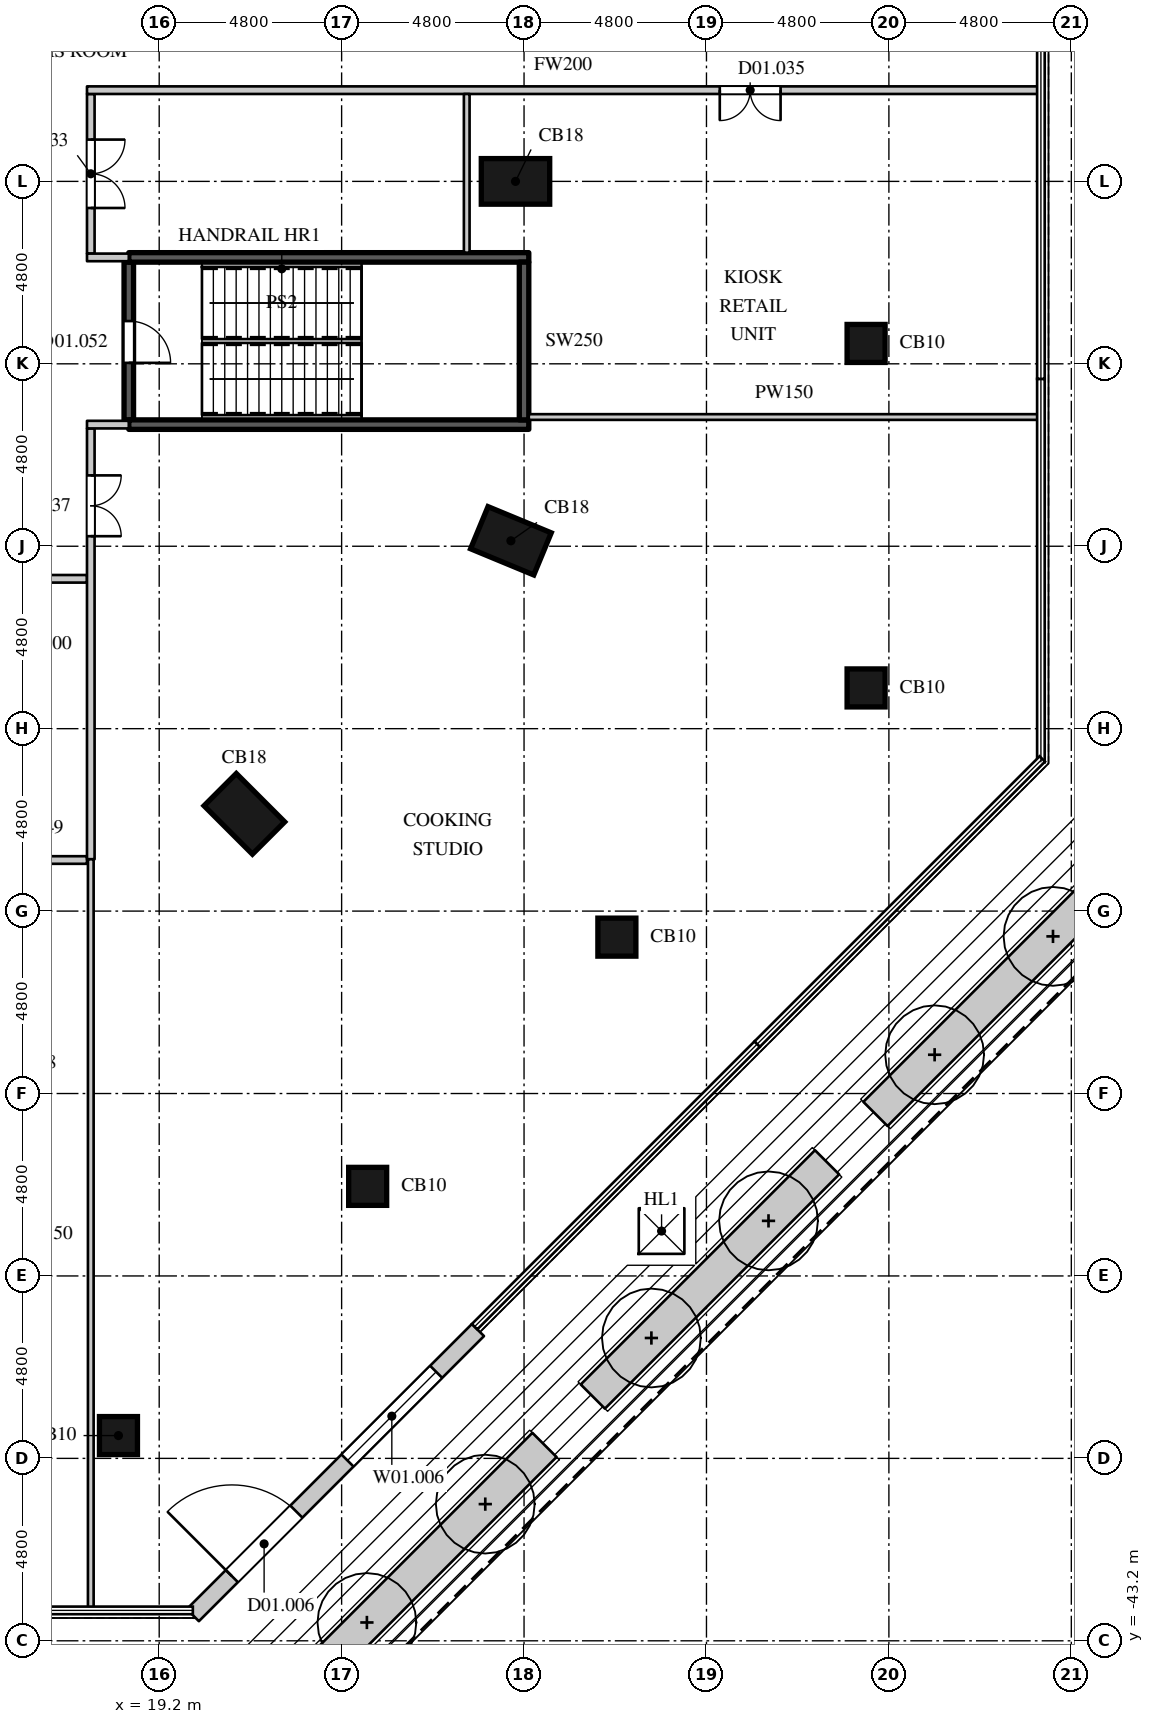
"""IFC4 building model, lengths in metres.
Left out: names, types, materials, properties, quantities, classifications, styles, units other than length and angle.
Written with IfcOpenShell. Run it as: python <this file> out.ifc"""

import sys

from ifc_helpers import new_model, si_unit, direction, frame, frame_2d, origin, origin_2d, place, context, subcontext, project, spatial, rectangle, extrude, element, fill, save


model = new_model("IFC4")
c1 = context("Model", 3, precision=1e-05, world=origin(), true_north=direction((0.0, 1.0)))
c2 = subcontext(c1, "Body", "Model", "MODEL_VIEW")
j1 = project(units=[si_unit("LENGTHUNIT", "METRE"), si_unit("PLANEANGLEUNIT", "RADIAN")], contexts=[c1])
p1 = place(None, origin())
s1 = spatial("IfcSite", under=j1, at=p1, CompositionType="ELEMENT")
p2 = place(p1, origin())
s2 = spatial("IfcBuilding", under=s1, at=p2, CompositionType="ELEMENT")
p3 = place(p2, frame((0.0, 0.0, 6.0)))
s3 = spatial("IfcBuildingStorey", under=s2, at=p3, CompositionType="ELEMENT", Elevation=6.0)
for number, where, z_axis, x_axis in (
    (1, (18.128, -37.8, 0.0), (0.0, 0.0, 1.0), (1.0, 0.0, 0.0)),
    (2, (24.685, -31.243, 0.0), (0.0, 0.0, 1.0), (1.0, 0.0, 0.0)),
    (3, (31.243, -24.685, 0.0), (0.0, 0.0, 1.0), (1.0, 0.0, 0.0)),
):
    element("IfcColumn", number, at=place(p3, frame(where, z_axis=z_axis, x_axis=x_axis)), inside=s3, PredefinedType="COLUMN", context=c2, shape_type="SweptSolid", body=[
        extrude(rectangle(XDim=1.0, YDim=1.0, at=origin_2d()), origin(), (0.0, 0.0, 1.0), 5.0),
    ])
p4 = place(p3, frame((21.441, -21.441, 0.0), z_axis=(0.0, 0.0, 1.0), x_axis=(0.707106781187, 0.707106781187, 0.0)))
e4 = element("IfcColumn", 4, at=p4, inside=s3, PredefinedType="COLUMN", context=c2, shape_type="SweptSolid", body=[
    extrude(rectangle(XDim=1.2, YDim=1.8, at=origin_2d()), origin(), (0.0, 0.0, 1.0), 5.0),
])
p5 = place(p3, frame((37.8, -18.128, 0.0), z_axis=(0.0, 0.0, 1.0), x_axis=(1.0, 0.0, 0.0)))
e5 = element("IfcColumn", 5, at=p5, inside=s3, PredefinedType="COLUMN", context=c2, shape_type="SweptSolid", body=[
    extrude(rectangle(XDim=1.0, YDim=1.0, at=origin_2d()), origin(), (0.0, 0.0, 1.0), 5.0),
])
p6 = place(p3, frame((28.454, -14.257, 0.0), z_axis=(0.0, 0.0, 1.0), x_axis=(0.382683496864, 0.923879505795, 0.0)))
e6 = element("IfcColumn", 6, at=p6, inside=s3, PredefinedType="COLUMN", context=c2, shape_type="SweptSolid", body=[
    extrude(rectangle(XDim=1.2, YDim=1.8, at=origin_2d()), origin(), (0.0, 0.0, 1.0), 5.0),
])
p7 = place(p3, frame((37.8, -9.064, 0.0), z_axis=(0.0, 0.0, 1.0), x_axis=(1.0, 0.0, 0.0)))
e7 = element("IfcColumn", 7, at=p7, inside=s3, PredefinedType="COLUMN", context=c2, shape_type="SweptSolid", body=[
    extrude(rectangle(XDim=1.0, YDim=1.0, at=origin_2d()), origin(), (0.0, 0.0, 1.0), 5.0),
])
p8 = place(p3, frame((28.575, -4.8, 0.0), z_axis=(0.0, 0.0, 1.0), x_axis=(0.0, 1.0, 0.0)))
e8 = element("IfcColumn", 8, at=p8, inside=s3, PredefinedType="COLUMN", context=c2, shape_type="SweptSolid", body=[
    extrude(rectangle(XDim=1.2, YDim=1.8, at=origin_2d()), origin(), (0.0, 0.0, 1.0), 5.0),
])
p9 = place(p3, frame((20.085, -42.525, 0.0), z_axis=(0.0, 0.0, 1.0), x_axis=(0.707106781187, 0.707106781187, 0.0)))
e9 = element("IfcWall", 9, at=p9, inside=s3, PredefinedType="ELEMENTEDWALL", context=c2, shape_type="SweptSolid", body=[
    extrude(rectangle(XDim=10.609, YDim=0.45, at=frame_2d((5.305, 0.0))), origin(), (0.0, 0.0, 1.0), 4.7),
])
p10 = place(p9, frame((1.452, 0.0, 0.0)))
e10 = element("IfcOpeningElement", 10, at=p10, cuts=e9, PredefinedType="OPENING", context=c2, shape_type="SweptSolid", body=[
    extrude(rectangle(XDim=2.4, YDim=2.7, at=frame_2d((1.2, 1.35))), frame((0.0, 0.235, 0.0), z_axis=(0.0, -1.0, 0.0), x_axis=(1.0, 0.0, 0.0)), (0.0, 0.0, 1.0), 0.47),
])
p11 = place(p9, frame((5.755, 0.0, 1.05)))
e11 = element("IfcOpeningElement", 11, at=p11, cuts=e9, PredefinedType="OPENING", context=c2, shape_type="SweptSolid", body=[
    extrude(rectangle(XDim=3.3, YDim=2.7, at=frame_2d((1.65, 1.35))), frame((0.0, 0.235, 0.0), z_axis=(0.0, -1.0, 0.0), x_axis=(1.0, 0.0, 0.0)), (0.0, 0.0, 1.0), 0.47),
])
p12 = place(p3, frame((23.108, -44.275, 0.0), z_axis=(0.0, 0.0, 1.0), x_axis=(0.707106781187, 0.707106781187, 0.0)))
e12 = element("IfcWall", 12, at=p12, inside=s3, PredefinedType="USERDEFINED", context=c2, shape_type="SweptSolid", body=[
    extrude(rectangle(XDim=8.81, YDim=0.9, at=frame_2d((4.405, 0.0))), origin(), (0.0, 0.0, 1.0), 0.9),
])
p13 = place(p3, frame((30.61, -36.773, 0.0), z_axis=(0.0, 0.0, 1.0), x_axis=(0.707106781187, 0.707106781187, 0.0)))
e13 = element("IfcWall", 13, at=p13, inside=s3, PredefinedType="USERDEFINED", context=c2, shape_type="SweptSolid", body=[
    extrude(rectangle(XDim=8.716, YDim=0.9, at=frame_2d((4.358, 0.0))), origin(), (0.0, 0.0, 1.0), 0.9),
])
p14 = place(p3, frame((38.046, -29.337, 0.0), z_axis=(0.0, 0.0, 1.0), x_axis=(0.707106781187, 0.707106781187, 0.0)))
e14 = element("IfcWall", 14, at=p14, inside=s3, PredefinedType="USERDEFINED", context=c2, shape_type="SweptSolid", body=[
    extrude(rectangle(XDim=8.81, YDim=0.9, at=frame_2d((4.405, 0.0))), origin(), (0.0, 0.0, 1.0), 0.9),
])
p15 = place(p3, frame((11.325, -22.656, 0.0), z_axis=(0.0, 0.0, 1.0), x_axis=(1.0, 0.0, 0.0)))
e15 = element("IfcWall", 15, at=p15, inside=s3, PredefinedType="PARTITIONING", context=c2, shape_type="SweptSolid", body=[
    extrude(rectangle(XDim=5.975, YDim=0.2, at=frame_2d((2.988, 0.0))), origin(), (0.0, 0.0, 1.0), 4.4),
])
p16 = place(p15, frame((2.55, 0.0, 0.0)))
e16 = element("IfcOpeningElement", 16, at=p16, cuts=e15, PredefinedType="OPENING", context=c2, shape_type="SweptSolid", body=[
    extrude(rectangle(XDim=0.9, YDim=2.2, at=frame_2d((0.45, 1.1))), frame((0.0, 0.11, 0.0), z_axis=(0.0, -1.0, 0.0), x_axis=(1.0, 0.0, 0.0)), (0.0, 0.0, 1.0), 0.22),
])
p17 = place(p3, frame((11.1, -15.257, 0.0), z_axis=(0.0, 0.0, 1.0), x_axis=(1.0, 0.0, 0.0)))
e17 = element("IfcWall", 17, at=p17, inside=s3, PredefinedType="PARTITIONING", context=c2, shape_type="SweptSolid", body=[
    extrude(rectangle(XDim=6.2, YDim=0.2, at=frame_2d((3.1, 0.0))), origin(), (0.0, 0.0, 1.0), 4.4),
])
p18 = place(p3, frame((17.4, -22.636, 0.0), z_axis=(0.0, 0.0, 1.0), x_axis=(0.0, 1.0, 0.0)))
e18 = element("IfcWall", 18, at=p18, inside=s3, PredefinedType="PARTITIONING", context=c2, shape_type="SweptSolid", body=[
    extrude(rectangle(XDim=11.336, YDim=0.2, at=frame_2d((5.668, 0.0))), origin(), (0.0, 0.0, 1.0), 4.4),
])
p19 = place(p18, frame((8.5, 0.0, 0.0)))
e19 = element("IfcOpeningElement", 19, at=p19, cuts=e18, PredefinedType="OPENING", context=c2, shape_type="SweptSolid", body=[
    extrude(rectangle(XDim=1.6, YDim=2.4, at=frame_2d((0.8, 1.2))), frame((0.0, 0.11, 0.0), z_axis=(0.0, -1.0, 0.0), x_axis=(1.0, 0.0, 0.0)), (0.0, 0.0, 1.0), 0.22),
])
p20 = place(p3, frame((17.3, -11.2, 0.0), z_axis=(0.0, 0.0, 1.0), x_axis=(1.0, 0.0, 0.0)))
e20 = element("IfcWall", 20, at=p20, inside=s3, PredefinedType="PARTITIONING", context=c2, shape_type="SweptSolid", body=[
    extrude(rectangle(XDim=1.1, YDim=0.2, at=frame_2d((0.55, 0.0))), origin(), (0.0, 0.0, 1.0), 4.4),
])
p21 = place(p3, frame((17.4, -6.7, 0.0), z_axis=(0.0, 0.0, 1.0), x_axis=(0.0, 1.0, 0.0)))
e21 = element("IfcWall", 21, at=p21, inside=s3, PredefinedType="PARTITIONING", context=c2, shape_type="SweptSolid", body=[
    extrude(rectangle(XDim=4.2, YDim=0.2, at=frame_2d((2.1, 0.0))), origin(), (0.0, 0.0, 1.0), 4.4),
])
p22 = place(p21, frame((1.2, 0.0, 0.0)))
e22 = element("IfcOpeningElement", 22, at=p22, cuts=e21, PredefinedType="OPENING", context=c2, shape_type="SweptSolid", body=[
    extrude(rectangle(XDim=1.8, YDim=2.4, at=frame_2d((0.9, 1.2))), frame((0.0, 0.11, 0.0), z_axis=(0.0, -1.0, 0.0), x_axis=(1.0, 0.0, 0.0)), (0.0, 0.0, 1.0), 0.22),
])
p23 = place(p3, frame((17.3, -6.8, 0.0), z_axis=(0.0, 0.0, 1.0), x_axis=(1.0, 0.0, 0.0)))
e23 = element("IfcWall", 23, at=p23, inside=s3, PredefinedType="PARTITIONING", context=c2, shape_type="SweptSolid", body=[
    extrude(rectangle(XDim=1.1, YDim=0.2, at=frame_2d((0.55, 0.0))), origin(), (0.0, 0.0, 1.0), 4.4),
])
p24 = place(p3, frame((17.3, -2.4, 0.0), z_axis=(0.0, 0.0, 1.0), x_axis=(1.0, 0.0, 0.0)))
e24 = element("IfcWall", 24, at=p24, inside=s3, PredefinedType="PARTITIONING", context=c2, shape_type="SweptSolid", body=[
    extrude(rectangle(XDim=25.055, YDim=0.2, at=frame_2d((12.527, 0.0))), origin(), (0.0, 0.0, 1.0), 4.4),
])
p25 = place(p24, frame((16.65, 0.0, 0.0)))
e25 = element("IfcOpeningElement", 25, at=p25, cuts=e24, PredefinedType="OPENING", context=c2, shape_type="SweptSolid", body=[
    extrude(rectangle(XDim=1.6, YDim=2.4, at=frame_2d((0.8, 1.2))), frame((0.0, 0.11, 0.0), z_axis=(0.0, -1.0, 0.0), x_axis=(1.0, 0.0, 0.0)), (0.0, 0.0, 1.0), 0.22),
])
p26 = place(p3, frame((17.4, -42.355, 0.0), z_axis=(0.0, 0.0, 1.0), x_axis=(0.0, 1.0, 0.0)))
e26 = element("IfcWall", 26, at=p26, inside=s3, PredefinedType="PARTITIONING", context=c2, shape_type="SweptSolid", body=[
    extrude(rectangle(XDim=19.719, YDim=0.15, at=frame_2d((9.86, 0.0))), origin(), (0.0, 0.0, 1.0), 4.4),
])
p27 = place(p3, frame((27.292, -6.675, 0.0), z_axis=(0.0, 0.0, 1.0), x_axis=(0.0, 1.0, 0.0)))
e27 = element("IfcWall", 27, at=p27, inside=s3, PredefinedType="PARTITIONING", context=c2, shape_type="SweptSolid", body=[
    extrude(rectangle(XDim=4.175, YDim=0.15, at=frame_2d((2.087, 0.0))), origin(), (0.0, 0.0, 1.0), 4.4),
])
p28 = place(p3, frame((28.925, -11.0, 0.0), z_axis=(0.0, 0.0, 1.0), x_axis=(1.0, 0.0, 0.0)))
e28 = element("IfcWall", 28, at=p28, inside=s3, PredefinedType="PARTITIONING", context=c2, shape_type="SweptSolid", body=[
    extrude(rectangle(XDim=13.43, YDim=0.15, at=frame_2d((6.715, 0.0))), origin(), (0.0, 0.0, 1.0), 4.4),
])
p29 = place(p3, frame((18.4, -11.075, 0.0), z_axis=(0.0, 0.0, 1.0), x_axis=(0.0, 1.0, 0.0)))
e29 = element("IfcWall", 29, at=p29, inside=s3, PredefinedType="SHEAR", context=c2, shape_type="SweptSolid", body=[
    extrude(rectangle(XDim=4.15, YDim=0.25, at=frame_2d((2.075, 0.0))), origin(), (0.0, 0.0, 1.0), 4.65),
])
p30 = place(p29, frame((1.5, 0.0, 0.0)))
e30 = element("IfcOpeningElement", 30, at=p30, cuts=e29, PredefinedType="OPENING", context=c2, shape_type="SweptSolid", body=[
    extrude(rectangle(XDim=1.1, YDim=2.2, at=frame_2d((0.55, 1.1))), frame((0.0, 0.135, 0.0), z_axis=(0.0, -1.0, 0.0), x_axis=(1.0, 0.0, 0.0)), (0.0, 0.0, 1.0), 0.27),
])
for number, where, z_axis, x_axis in (
    (31, (18.4, -11.2, 0.0), (0.0, 0.0, 1.0), (1.0, 0.0, 0.0)),
    (32, (18.4, -6.8, 0.0), (0.0, 0.0, 1.0), (1.0, 0.0, 0.0)),
):
    element("IfcWall", number, at=place(p3, frame(where, z_axis=z_axis, x_axis=x_axis)), inside=s3, PredefinedType="SHEAR", context=c2, shape_type="SweptSolid", body=[
        extrude(rectangle(XDim=10.525, YDim=0.25, at=frame_2d((5.263, 0.0))), origin(), (0.0, 0.0, 1.0), 4.65),
    ])
p31 = place(p3, frame((28.8, -11.075, 0.0), z_axis=(0.0, 0.0, 1.0), x_axis=(0.0, 1.0, 0.0)))
e33 = element("IfcWall", 33, at=p31, inside=s3, PredefinedType="SHEAR", context=c2, shape_type="SweptSolid", body=[
    extrude(rectangle(XDim=4.15, YDim=0.25, at=frame_2d((2.075, 0.0))), origin(), (0.0, 0.0, 1.0), 4.65),
])
p32 = place(p10, origin())
e34 = element("IfcDoor", 34, at=p32, inside=s3, OperationType="SINGLE_SWING_LEFT", PredefinedType="DOOR", context=c2, shape_type="SweptSolid", body=[
    extrude(rectangle(XDim=2.4, YDim=2.7, at=frame_2d((1.2, 1.35))), frame((0.0, 0.13, 0.0), z_axis=(0.0, -1.0, 0.0), x_axis=(1.0, 0.0, 0.0)), (0.0, 0.0, 1.0), 0.05),
])
fill(e10, e34)
p33 = place(p11, origin())
e35 = element("IfcWindow", 35, at=p33, inside=s3, PartitioningType="SINGLE_PANEL", PredefinedType="WINDOW", context=c2, shape_type="SweptSolid", body=[
    extrude(rectangle(XDim=3.3, YDim=2.7, at=frame_2d((1.65, 1.35))), frame((0.0, 0.135, 0.0), z_axis=(0.0, -1.0, 0.0), x_axis=(1.0, 0.0, 0.0)), (0.0, 0.0, 1.0), 0.06),
])
fill(e11, e35)
p34 = place(p3, frame((0.0, 0.0, -0.35)))
p35 = place(p34, frame((32.419, -32.419, 0.0)))
p36 = place(p35, frame((0.0, 0.0, 0.3)))
e36 = element("IfcWindow", 36, at=p36, inside=s3, PartitioningType="SINGLE_PANEL", PredefinedType="SKYLIGHT", context=c2, shape_type="SweptSolid", body=[
    extrude(rectangle(XDim=1.2, YDim=1.2, at=origin_2d()), origin(), (0.0, 0.0, 1.0), 0.05),
])
p37 = place(p22, origin())
e37 = element("IfcDoor", 37, at=p37, inside=s3, OperationType="DOUBLE_DOOR_SINGLE_SWING", PredefinedType="DOOR", context=c2, shape_type="SweptSolid", body=[
    extrude(rectangle(XDim=1.8, YDim=2.4, at=frame_2d((0.9, 1.2))), frame((0.0, 0.025, 0.0), z_axis=(0.0, -1.0, 0.0), x_axis=(1.0, 0.0, 0.0)), (0.0, 0.0, 1.0), 0.05),
])
fill(e22, e37)
p38 = place(p25, origin())
e38 = element("IfcDoor", 38, at=p38, inside=s3, OperationType="DOUBLE_DOOR_SINGLE_SWING", PredefinedType="DOOR", context=c2, shape_type="SweptSolid", body=[
    extrude(rectangle(XDim=1.6, YDim=2.4, at=frame_2d((0.8, 1.2))), frame((0.0, 0.025, 0.0), z_axis=(0.0, -1.0, 0.0), x_axis=(1.0, 0.0, 0.0)), (0.0, 0.0, 1.0), 0.05),
])
fill(e25, e38)
p39 = place(p19, origin())
e39 = element("IfcDoor", 39, at=p39, inside=s3, OperationType="DOUBLE_DOOR_SINGLE_SWING", PredefinedType="DOOR", context=c2, shape_type="SweptSolid", body=[
    extrude(rectangle(XDim=1.6, YDim=2.4, at=frame_2d((0.8, 1.2))), frame((0.0, 0.025, 0.0), z_axis=(0.0, -1.0, 0.0), x_axis=(1.0, 0.0, 0.0)), (0.0, 0.0, 1.0), 0.05),
])
fill(e19, e39)
p40 = place(p30, origin())
e40 = element("IfcDoor", 40, at=p40, inside=s3, OperationType="SINGLE_SWING_RIGHT", PredefinedType="DOOR", context=c2, shape_type="SweptSolid", body=[
    extrude(rectangle(XDim=1.1, YDim=2.2, at=frame_2d((0.55, 1.1))), frame((0.0, 0.025, 0.0), z_axis=(0.0, -1.0, 0.0), x_axis=(1.0, 0.0, 0.0)), (0.0, 0.0, 1.0), 0.05),
])
fill(e30, e40)
save(model, sys.argv[1])
